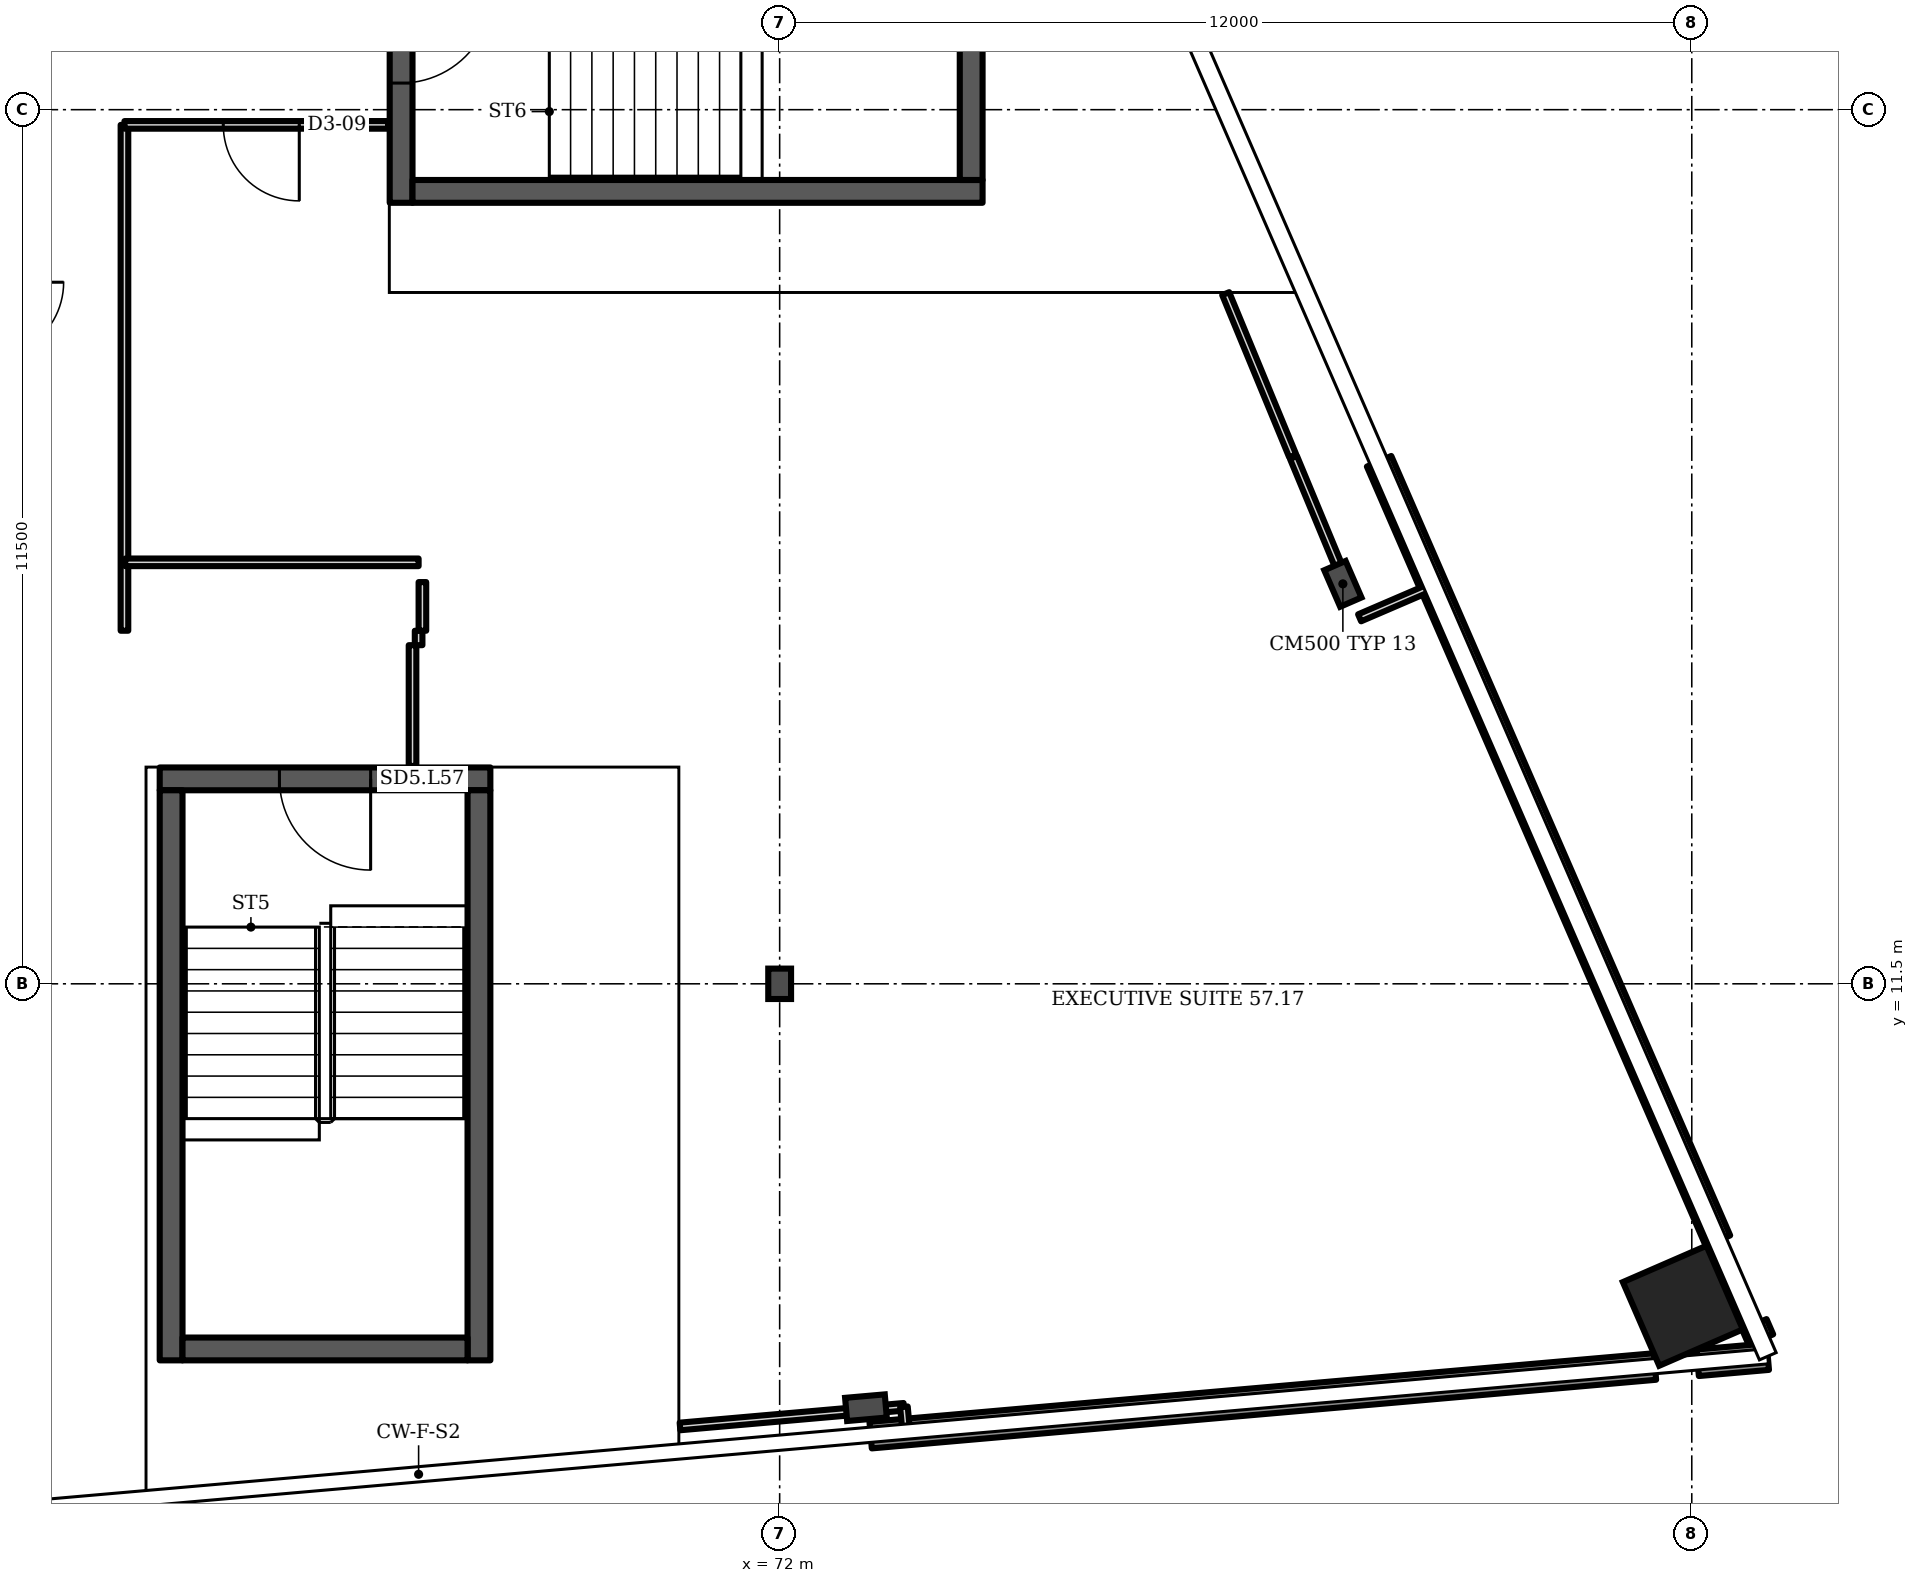
"""IFC4 building model, lengths in metres.
Left out: names, types, materials, properties, quantities, classifications, styles, units other than length and angle.
Written with IfcOpenShell. Run it as: python <this file> out.ifc"""

import sys

from ifc_helpers import new_model, si_unit, direction, frame, frame_2d, origin, origin_2d, place, context, subcontext, project, spatial, rectangle, i_section, extrude, element, fill, save


model = new_model("IFC4")
c1 = context("Model", 3, precision=1e-05, world=origin(), true_north=direction((0.0, 1.0)))
c2 = subcontext(c1, "Body", "Model", "MODEL_VIEW")
j1 = project(units=[si_unit("LENGTHUNIT", "METRE"), si_unit("PLANEANGLEUNIT", "RADIAN")], contexts=[c1])
p1 = place(None, origin())
s1 = spatial("IfcSite", under=j1, at=p1, CompositionType="ELEMENT")
p2 = place(p1, origin())
s2 = spatial("IfcBuilding", under=s1, at=p2, CompositionType="ELEMENT")
p3 = place(p2, frame((0.0, 0.0, 228.7)))
s3 = spatial("IfcBuildingStorey", under=s2, at=p3, CompositionType="ELEMENT", Elevation=228.7)
p4 = place(p3, frame((83.883, 7.265, 0.0), z_axis=(0.0, 0.0, 1.0), x_axis=(-0.398727, 0.917072, 0.0)))
e1 = element("IfcColumn", 1, at=p4, inside=s3, PredefinedType="COLUMN", context=c2, shape_type="SweptSolid", body=[
    extrude(rectangle(XDim=1.2, YDim=1.2, at=origin_2d()), origin(), (0.0, 0.0, 1.0), 3.6),
])
for number, where, z_axis, x_axis in (
    (2, (73.135, 5.923, 0.0), (0.0, 0.0, 1.0), (0.087, -0.996, 0.0)),
    (3, (79.41, 16.762, 0.0), (0.0, 0.0, 1.0), (0.917, 0.399, 0.0)),
):
    element("IfcColumn", number, at=place(p3, frame(where, z_axis=z_axis, x_axis=x_axis)), inside=s3, PredefinedType="COLUMN", context=c2, shape_type="SweptSolid", body=[
        extrude(i_section(OverallWidth=0.306, OverallDepth=0.524, WebThickness=0.021, FlangeThickness=0.04, FilletRadius=0.027, at=origin_2d()), origin(), (0.0, 0.0, 1.0), 3.6),
    ])
p5 = place(p3, frame((72.0, 11.5, 0.0), z_axis=(0.0, 0.0, 1.0), x_axis=(1.0, 0.0, 0.0)))
e4 = element("IfcColumn", 4, at=p5, inside=s3, PredefinedType="COLUMN", context=c2, shape_type="SweptSolid", body=[
    extrude(i_section(OverallWidth=0.3, OverallDepth=0.4, WebThickness=0.013, FlangeThickness=0.024, FilletRadius=0.027, at=origin_2d()), origin(), (0.0, 0.0, 1.0), 3.6),
])
p6 = place(p3, frame((73.197, 5.562, 0.0), z_axis=(0.0, 0.0, 1.0), x_axis=(0.996198, 0.087163, 0.0)))
e5 = element("IfcWall", 5, at=p6, inside=s3, PredefinedType="SOLIDWALL", context=c2, shape_type="SweptSolid", body=[
    extrude(rectangle(XDim=10.358, YDim=0.35, at=frame_2d((5.179, 0.0))), origin(), (0.0, 0.0, 1.0), 1.0),
])
p7 = place(p3, frame((84.078, 6.514, 0.0), z_axis=(0.0, 0.0, 1.0), x_axis=(0.996213, 0.086971, 0.0)))
e6 = element("IfcWall", 6, at=p7, inside=s3, PredefinedType="SOLIDWALL", context=c2, shape_type="SweptSolid", body=[
    extrude(rectangle(XDim=0.926, YDim=0.35, at=frame_2d((0.463, 0.0))), origin(), (0.0, 0.0, 1.0), 1.0),
])
p8 = place(p3, frame((84.91, 6.819, 0.0), z_axis=(0.0, 0.0, 1.0), x_axis=(-0.398359, 0.91723, 0.0)))
e7 = element("IfcWall", 7, at=p8, inside=s3, PredefinedType="SOLIDWALL", context=c2, shape_type="SweptSolid", body=[
    extrude(rectangle(XDim=0.219, YDim=0.35, at=frame_2d((0.109, 0.0))), origin(), (0.0, 0.0, 1.0), 1.0),
])
p9 = place(p3, frame((84.345, 8.12, 0.0), z_axis=(0.0, 0.0, 1.0), x_axis=(-0.398721, 0.917067, 0.0)))
e8 = element("IfcWall", 8, at=p9, inside=s3, PredefinedType="SOLIDWALL", context=c2, shape_type="SweptSolid", body=[
    extrude(rectangle(XDim=11.182, YDim=0.35, at=frame_2d((5.591, 0.0))), origin(), (0.0, 0.0, 1.0), 1.0),
])
p10 = place(p3, frame((63.844, 14.196, 0.0), z_axis=(0.0, 0.0, 1.0), x_axis=(1.0, 0.0, 0.0)))
e9 = element("IfcWall", 9, at=p10, inside=s3, PredefinedType="SHEAR", context=c2, shape_type="SweptSolid", body=[
    extrude(rectangle(XDim=4.35, YDim=0.3, at=frame_2d((2.175, 0.0))), origin(), (0.0, 0.0, 1.0), 3.2),
])
p11 = place(p10, frame((1.575, 0.0, 0.0)))
e10 = element("IfcOpeningElement", 10, at=p11, cuts=e9, PredefinedType="OPENING", context=c2, shape_type="SweptSolid", body=[
    extrude(rectangle(XDim=1.2, YDim=2.1, at=frame_2d((0.6, 1.05))), frame((0.0, 0.16, 0.0), z_axis=(0.0, -1.0, 0.0), x_axis=(1.0, 0.0, 0.0)), (0.0, 0.0, 1.0), 0.32),
])
p12 = place(p3, frame((67.02, 21.775, 0.0), z_axis=(0.0, 0.0, 1.0), x_axis=(0.0, 1.0, 0.0)))
e11 = element("IfcWall", 11, at=p12, inside=s3, PredefinedType="SHEAR", context=c2, shape_type="SweptSolid", body=[
    extrude(rectangle(XDim=4.35, YDim=0.3, at=frame_2d((2.175, 0.0))), origin(), (0.0, 0.0, 1.0), 3.2),
])
p13 = place(p12, frame((1.575, 0.0, 0.0)))
e12 = element("IfcOpeningElement", 12, at=p13, cuts=e11, PredefinedType="OPENING", context=c2, shape_type="SweptSolid", body=[
    extrude(rectangle(XDim=1.2, YDim=2.1, at=frame_2d((0.6, 1.05))), frame((0.0, 0.16, 0.0), z_axis=(0.0, -1.0, 0.0), x_axis=(1.0, 0.0, 0.0)), (0.0, 0.0, 1.0), 0.32),
])
p14 = place(p3, frame((63.38, 16.145, 0.0), z_axis=(0.0, 0.0, 1.0), x_axis=(0.0, 1.0, 0.0)))
e13 = element("IfcWall", 13, at=p14, inside=s3, PredefinedType="PARTITIONING", context=c2, shape_type="SweptSolid", body=[
    extrude(rectangle(XDim=6.655, YDim=0.1, at=frame_2d((3.328, 0.0))), origin(), (0.0, 0.0, 1.0), 3.2),
])
p15 = place(p3, frame((63.38, 22.8, 0.0), z_axis=(0.0, 0.0, 1.0), x_axis=(1.0, 0.0, 0.0)))
e14 = element("IfcWall", 14, at=p15, inside=s3, PredefinedType="PARTITIONING", context=c2, shape_type="SweptSolid", body=[
    extrude(rectangle(XDim=3.47, YDim=0.1, at=frame_2d((1.735, 0.0))), origin(), (0.0, 0.0, 1.0), 3.2),
])
p16 = place(p15, frame((1.3, 0.0, 0.0)))
e15 = element("IfcOpeningElement", 15, at=p16, cuts=e14, PredefinedType="OPENING", context=c2, shape_type="SweptSolid", body=[
    extrude(rectangle(XDim=1.0, YDim=2.1, at=frame_2d((0.5, 1.05))), frame((0.0, 0.06, 0.0), z_axis=(0.0, -1.0, 0.0), x_axis=(1.0, 0.0, 0.0)), (0.0, 0.0, 1.0), 0.12),
])
p17 = place(p3, frame((63.39, 17.045, 0.0), z_axis=(0.0, 0.0, 1.0), x_axis=(1.0, 0.0, 0.0)))
e16 = element("IfcWall", 16, at=p17, inside=s3, PredefinedType="PARTITIONING", context=c2, shape_type="SweptSolid", body=[
    extrude(rectangle(XDim=3.86, YDim=0.1, at=frame_2d((1.93, 0.0))), origin(), (0.0, 0.0, 1.0), 3.2),
])
p18 = place(p3, frame((67.17, 14.366, 0.0), z_axis=(0.0, 0.0, 1.0), x_axis=(0.0, 1.0, 0.0)))
e17 = element("IfcWall", 17, at=p18, inside=s3, PredefinedType="PARTITIONING", context=c2, shape_type="SweptSolid", body=[
    extrude(rectangle(XDim=1.589, YDim=0.1, at=frame_2d((0.794, 0.0))), origin(), (0.0, 0.0, 1.0), 3.2),
])
p19 = place(p3, frame((67.25, 15.955, 0.0), z_axis=(0.0, 0.0, 1.0), x_axis=(0.0, 1.0, 0.0)))
e18 = element("IfcWall", 18, at=p19, inside=s3, PredefinedType="PARTITIONING", context=c2, shape_type="SweptSolid", body=[
    extrude(rectangle(XDim=0.19, YDim=0.1, at=frame_2d((0.095, 0.0))), origin(), (0.0, 0.0, 1.0), 3.2),
])
p20 = place(p3, frame((67.3, 16.145, 0.0), z_axis=(0.0, 0.0, 1.0), x_axis=(0.0, 1.0, 0.0)))
e19 = element("IfcWall", 19, at=p20, inside=s3, PredefinedType="PARTITIONING", context=c2, shape_type="SweptSolid", body=[
    extrude(rectangle(XDim=0.64, YDim=0.1, at=frame_2d((0.32, 0.0))), origin(), (0.0, 0.0, 1.0), 3.2),
])
p21 = place(p3, frame((70.689, 5.677, 0.0), z_axis=(0.0, 0.0, 1.0), x_axis=(0.996174, 0.087417, 0.0)))
e20 = element("IfcWall", 20, at=p21, inside=s3, PredefinedType="PARTITIONING", context=c2, shape_type="SweptSolid", body=[
    extrude(rectangle(XDim=2.958, YDim=0.1, at=frame_2d((1.479, 0.0))), origin(), (0.0, 0.0, 1.0), 2.58),
])
p22 = place(p3, frame((73.663, 5.628, 0.0), z_axis=(0.0, 0.0, 1.0), x_axis=(-0.091893, 0.995772, 0.0)))
e21 = element("IfcWall", 21, at=p22, inside=s3, PredefinedType="PARTITIONING", context=c2, shape_type="SweptSolid", body=[
    extrude(rectangle(XDim=0.308, YDim=0.1, at=frame_2d((0.154, 0.0))), origin(), (0.0, 0.0, 1.0), 3.2),
])
p23 = place(p3, frame((78.75, 18.445, 0.0), z_axis=(0.0, 0.0, 1.0), x_axis=(-0.381663, 0.924299, 0.0)))
e22 = element("IfcWall", 22, at=p23, inside=s3, PredefinedType="PARTITIONING", context=c2, shape_type="SweptSolid", body=[
    extrude(rectangle(XDim=2.31, YDim=0.1, at=frame_2d((1.155, 0.0))), origin(), (0.0, 0.0, 1.0), 3.2),
])
p24 = place(p3, frame((79.35, 17.005, 0.0), z_axis=(0.0, 0.0, 1.0), x_axis=(-0.383703, 0.923459, 0.0)))
e23 = element("IfcWall", 23, at=p24, inside=s3, PredefinedType="PARTITIONING", context=c2, shape_type="SweptSolid", body=[
    extrude(rectangle(XDim=1.538, YDim=0.1, at=frame_2d((0.769, 0.0))), origin(), (0.0, 0.0, 1.0), 3.2),
])
p25 = place(p3, frame((79.63, 16.315, 0.0), z_axis=(0.0, 0.0, 1.0), x_axis=(0.918616, 0.395147, 0.0)))
e24 = element("IfcWall", 24, at=p25, inside=s3, PredefinedType="PARTITIONING", context=c2, shape_type="SweptSolid", body=[
    extrude(rectangle(XDim=1.031, YDim=0.1, at=frame_2d((0.516, 0.0))), origin(), (0.0, 0.0, 1.0), 2.58),
])
for number, where, z_axis, x_axis in (
    (25, (63.994, 6.546, 0.0), (0.0, 0.0, 1.0), (0.0, 1.0, 0.0)),
    (26, (68.044, 6.546, 0.0), (0.0, 0.0, 1.0), (0.0, 1.0, 0.0)),
):
    element("IfcWall", number, at=place(p3, frame(where, z_axis=z_axis, x_axis=x_axis)), inside=s3, PredefinedType="SHEAR", context=c2, shape_type="SweptSolid", body=[
        extrude(rectangle(XDim=7.5, YDim=0.3, at=frame_2d((3.75, 0.0))), origin(), (0.0, 0.0, 1.0), 3.2),
    ])
p26 = place(p3, frame((64.144, 6.696, 0.0), z_axis=(0.0, 0.0, 1.0), x_axis=(1.0, 0.0, 0.0)))
e27 = element("IfcWall", 27, at=p26, inside=s3, PredefinedType="SHEAR", context=c2, shape_type="SweptSolid", body=[
    extrude(rectangle(XDim=3.75, YDim=0.3, at=frame_2d((1.875, 0.0))), origin(), (0.0, 0.0, 1.0), 3.2),
])
p27 = place(p3, frame((67.17, 21.925, 0.0), z_axis=(0.0, 0.0, 1.0), x_axis=(1.0, 0.0, 0.0)))
e28 = element("IfcWall", 28, at=p27, inside=s3, PredefinedType="SHEAR", context=c2, shape_type="SweptSolid", body=[
    extrude(rectangle(XDim=7.5, YDim=0.3, at=frame_2d((3.75, 0.0))), origin(), (0.0, 0.0, 1.0), 3.2),
])
p28 = place(p3, frame((74.52, 22.075, 0.0), z_axis=(0.0, 0.0, 1.0), x_axis=(0.0, 1.0, 0.0)))
e29 = element("IfcWall", 29, at=p28, inside=s3, PredefinedType="SHEAR", context=c2, shape_type="SweptSolid", body=[
    extrude(rectangle(XDim=3.75, YDim=0.3, at=frame_2d((1.875, 0.0))), origin(), (0.0, 0.0, 1.0), 3.2),
])
p29 = place(p11, origin())
e30 = element("IfcDoor", 30, at=p29, inside=s3, OperationType="SINGLE_SWING_RIGHT", PredefinedType="DOOR", context=c2, shape_type="SweptSolid", body=[
    extrude(rectangle(XDim=1.2, YDim=2.1, at=frame_2d((0.6, 1.05))), frame((0.0, 0.025, 0.0), z_axis=(0.0, -1.0, 0.0), x_axis=(1.0, 0.0, 0.0)), (0.0, 0.0, 1.0), 0.05),
])
fill(e10, e30)
p30 = place(p13, origin())
e31 = element("IfcDoor", 31, at=p30, inside=s3, OperationType="SINGLE_SWING_RIGHT", PredefinedType="DOOR", context=c2, shape_type="SweptSolid", body=[
    extrude(rectangle(XDim=1.2, YDim=2.1, at=frame_2d((0.6, 1.05))), frame((0.0, 0.025, 0.0), z_axis=(0.0, -1.0, 0.0), x_axis=(1.0, 0.0, 0.0)), (0.0, 0.0, 1.0), 0.05),
])
fill(e12, e31)
p31 = place(p16, origin())
e32 = element("IfcDoor", 32, at=p31, inside=s3, OperationType="SINGLE_SWING_RIGHT", PredefinedType="DOOR", context=c2, shape_type="SweptSolid", body=[
    extrude(rectangle(XDim=1.0, YDim=2.1, at=frame_2d((0.5, 1.05))), frame((0.0, 0.025, 0.0), z_axis=(0.0, -1.0, 0.0), x_axis=(1.0, 0.0, 0.0)), (0.0, 0.0, 1.0), 0.05),
])
fill(e15, e32)
save(model, sys.argv[1])
